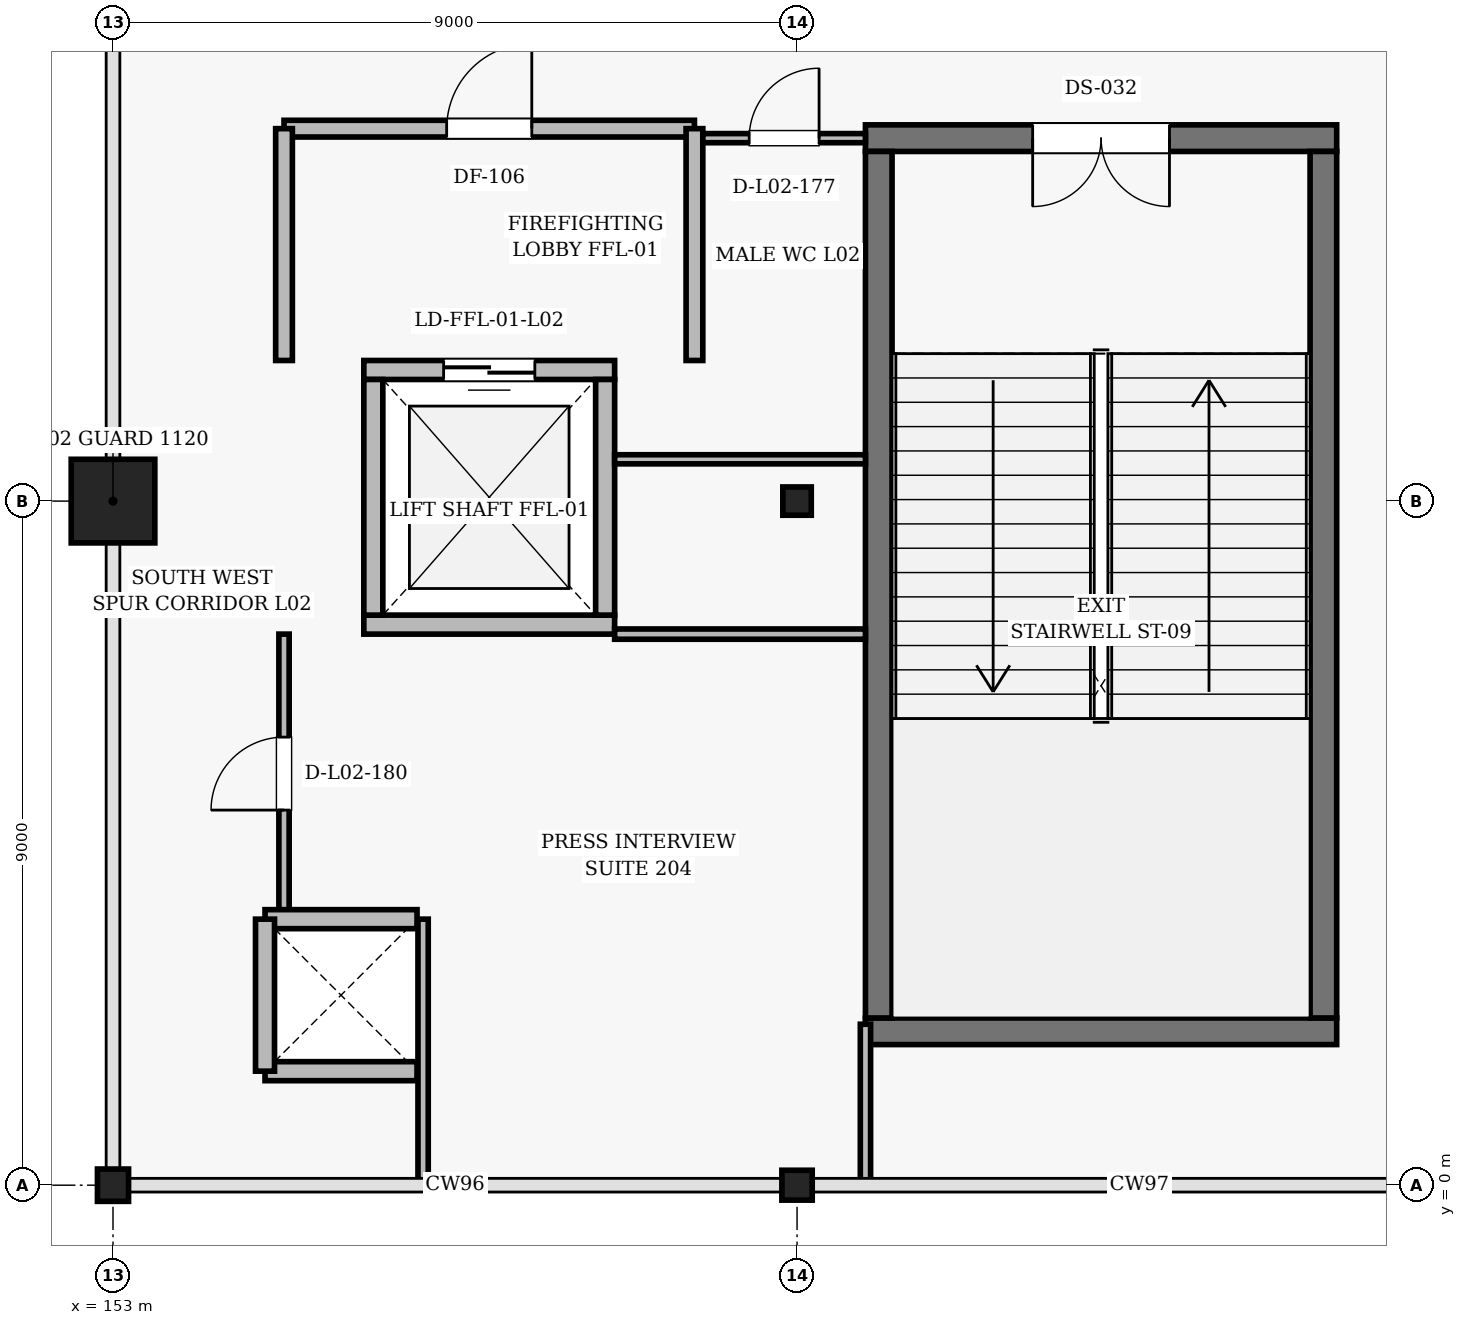
"""IFC4 building model, lengths in metres.
Left out: names, types, materials, properties, quantities, classifications, styles, units other than length and angle.
Written with IfcOpenShell. Run it as: python <this file> out.ifc"""

import sys

from ifc_helpers import new_model, si_unit, direction, frame, frame_2d, origin, origin_2d, place, context, subcontext, project, spatial, rectangle, i_section, extrude, element, fill, save


model = new_model("IFC4")
c1 = context("Model", 3, precision=1e-05, world=origin(), true_north=direction((0.0, 1.0)))
c2 = subcontext(c1, "Body", "Model", "MODEL_VIEW")
j1 = project(units=[si_unit("LENGTHUNIT", "METRE"), si_unit("PLANEANGLEUNIT", "RADIAN")], contexts=[c1])
p1 = place(None, origin())
s1 = spatial("IfcSite", under=j1, at=p1, CompositionType="ELEMENT")
p2 = place(p1, origin())
s2 = spatial("IfcBuilding", under=s1, at=p2, CompositionType="ELEMENT")
p3 = place(p2, frame((0.0, 0.0, 10.8)))
s3 = spatial("IfcBuildingStorey", under=s2, at=p3, CompositionType="ELEMENT", Elevation=10.8)
p4 = place(p3, frame((153.0, 0.0, 0.0), z_axis=(0.0, 0.0, 1.0), x_axis=(1.0, 0.0, 0.0)))
e1 = element("IfcColumn", 1, at=p4, inside=s3, PredefinedType="COLUMN", context=c2, shape_type="SweptSolid", body=[
    extrude(i_section(OverallWidth=0.409, OverallDepth=0.425, WebThickness=0.031, FlangeThickness=0.049, FilletRadius=0.02, at=origin_2d()), origin(), (0.0, 0.0, 1.0), 4.8),
])
p5 = place(p3, frame((153.0, 9.0, 0.0), z_axis=(0.0, 0.0, 1.0), x_axis=(1.0, 0.0, 0.0)))
e2 = element("IfcColumn", 2, at=p5, inside=s3, PredefinedType="COLUMN", context=c2, shape_type="SweptSolid", body=[
    extrude(rectangle(XDim=1.1, YDim=1.1, at=origin_2d()), origin(), (0.0, 0.0, 1.0), 4.8),
])
p6 = place(p3, frame((162.0, 0.0, 0.0), z_axis=(0.0, 0.0, 1.0), x_axis=(1.0, 0.0, 0.0)))
e3 = element("IfcColumn", 3, at=p6, inside=s3, PredefinedType="COLUMN", context=c2, shape_type="SweptSolid", body=[
    extrude(i_section(OverallWidth=0.399, OverallDepth=0.393, WebThickness=0.023, FlangeThickness=0.037, FilletRadius=0.018, at=origin_2d()), origin(), (0.0, 0.0, 1.0), 4.8),
])
p7 = place(p3, frame((162.0, 9.0, 0.0), z_axis=(0.0, 0.0, 1.0), x_axis=(1.0, 0.0, 0.0)))
e4 = element("IfcColumn", 4, at=p7, inside=s3, PredefinedType="COLUMN", context=c2, shape_type="SweptSolid", body=[
    extrude(i_section(OverallWidth=0.374, OverallDepth=0.372, WebThickness=0.016, FlangeThickness=0.026, FilletRadius=0.016, at=origin_2d()), origin(), (0.0, 0.0, 1.0), 4.8),
])
p8 = place(p3, frame((162.9, 2.025, 0.0), z_axis=(0.0, 0.0, 1.0), x_axis=(1.0, 0.0, 0.0)))
e5 = element("IfcWall", 5, at=p8, inside=s3, PredefinedType="SHEAR", context=c2, shape_type="SweptSolid", body=[
    extrude(rectangle(XDim=6.2, YDim=0.35, at=frame_2d((3.1, 0.0))), origin(), (0.0, 0.0, 1.0), 4.6),
])
p9 = place(p3, frame((169.1, 13.775, 0.0), z_axis=(0.0, 0.0, 1.0), x_axis=(-1.0, 0.0, 0.0)))
e6 = element("IfcWall", 6, at=p9, inside=s3, PredefinedType="SHEAR", context=c2, shape_type="SweptSolid", body=[
    extrude(rectangle(XDim=6.2, YDim=0.35, at=frame_2d((3.1, 0.0))), origin(), (0.0, 0.0, 1.0), 4.6),
])
p10 = place(p9, frame((2.2, 0.0, 0.0)))
e7 = element("IfcOpeningElement", 7, at=p10, cuts=e6, PredefinedType="OPENING", context=c2, shape_type="SweptSolid", body=[
    extrude(rectangle(XDim=1.8, YDim=2.2, at=frame_2d((0.9, 1.1))), frame((0.0, 0.185, 0.0), z_axis=(0.0, -1.0, 0.0), x_axis=(1.0, 0.0, 0.0)), (0.0, 0.0, 1.0), 0.37),
])
for number, where, z_axis, x_axis in (
    (8, (163.075, 13.6, 0.0), (0.0, 0.0, 1.0), (0.0, -1.0, 0.0)),
    (9, (168.925, 2.2, 0.0), (0.0, 0.0, 1.0), (0.0, 1.0, 0.0)),
):
    element("IfcWall", number, at=place(p3, frame(where, z_axis=z_axis, x_axis=x_axis)), inside=s3, PredefinedType="SHEAR", context=c2, shape_type="SweptSolid", body=[
        extrude(rectangle(XDim=11.4, YDim=0.35, at=frame_2d((5.7, 0.0))), origin(), (0.0, 0.0, 1.0), 4.6),
    ])
p11 = place(p3, frame((156.3, 7.375, 0.0), z_axis=(0.0, 0.0, 1.0), x_axis=(1.0, 0.0, 0.0)))
e10 = element("IfcWall", 10, at=p11, inside=s3, PredefinedType="SOLIDWALL", context=c2, shape_type="SweptSolid", body=[
    extrude(rectangle(XDim=3.3, YDim=0.25, at=frame_2d((1.65, 0.0))), origin(), (0.0, 0.0, 1.0), 4.6),
])
p12 = place(p3, frame((159.6, 10.725, 0.0), z_axis=(0.0, 0.0, 1.0), x_axis=(-1.0, 0.0, 0.0)))
e11 = element("IfcWall", 11, at=p12, inside=s3, PredefinedType="SOLIDWALL", context=c2, shape_type="SweptSolid", body=[
    extrude(rectangle(XDim=3.3, YDim=0.25, at=frame_2d((1.65, 0.0))), origin(), (0.0, 0.0, 1.0), 4.6),
])
p13 = place(p12, frame((1.05, 0.0, 0.0)))
e12 = element("IfcOpeningElement", 12, at=p13, cuts=e11, PredefinedType="OPENING", context=c2, shape_type="SweptSolid", body=[
    extrude(rectangle(XDim=1.2, YDim=2.25, at=frame_2d((0.6, 1.125))), frame((0.0, 0.135, 0.0), z_axis=(0.0, -1.0, 0.0), x_axis=(1.0, 0.0, 0.0)), (0.0, 0.0, 1.0), 0.27),
])
for number, where, z_axis, x_axis in (
    (13, (156.425, 10.6, 0.0), (0.0, 0.0, 1.0), (0.0, -1.0, 0.0)),
    (14, (159.475, 7.5, 0.0), (0.0, 0.0, 1.0), (0.0, 1.0, 0.0)),
):
    element("IfcWall", number, at=place(p3, frame(where, z_axis=z_axis, x_axis=x_axis)), inside=s3, PredefinedType="SOLIDWALL", context=c2, shape_type="SweptSolid", body=[
        extrude(rectangle(XDim=3.1, YDim=0.25, at=frame_2d((1.55, 0.0))), origin(), (0.0, 0.0, 1.0), 4.6),
    ])
p14 = place(p3, frame((155.25, 13.9, 0.0), z_axis=(0.0, 0.0, 1.0), x_axis=(1.0, 0.0, 0.0)))
e15 = element("IfcWall", 15, at=p14, inside=s3, PredefinedType="SOLIDWALL", context=c2, shape_type="SweptSolid", body=[
    extrude(rectangle(XDim=5.4, YDim=0.22, at=frame_2d((2.7, 0.0))), origin(), (0.0, 0.0, 1.0), 4.6),
])
p15 = place(p14, frame((2.14, 0.0, 0.0)))
e16 = element("IfcOpeningElement", 16, at=p15, cuts=e15, PredefinedType="OPENING", context=c2, shape_type="SweptSolid", body=[
    extrude(rectangle(XDim=1.12, YDim=2.2, at=frame_2d((0.56, 1.1))), frame((0.0, 0.12, 0.0), z_axis=(0.0, -1.0, 0.0), x_axis=(1.0, 0.0, 0.0)), (0.0, 0.0, 1.0), 0.24),
])
for number, where, z_axis, x_axis in (
    (17, (155.25, 10.85, 0.0), (0.0, 0.0, 1.0), (0.0, 1.0, 0.0)),
    (18, (160.65, 10.85, 0.0), (0.0, 0.0, 1.0), (0.0, 1.0, 0.0)),
):
    element("IfcWall", number, at=place(p3, frame(where, z_axis=z_axis, x_axis=x_axis)), inside=s3, PredefinedType="SOLIDWALL", context=c2, shape_type="SweptSolid", body=[
        extrude(rectangle(XDim=3.05, YDim=0.22, at=frame_2d((1.525, 0.0))), origin(), (0.0, 0.0, 1.0), 4.6),
    ])
p16 = place(p3, frame((160.76, 13.775, 0.0), z_axis=(0.0, 0.0, 1.0), x_axis=(1.0, 0.0, 0.0)))
e19 = element("IfcWall", 19, at=p16, inside=s3, PredefinedType="PARTITIONING", context=c2, shape_type="SweptSolid", body=[
    extrude(rectangle(XDim=2.14, YDim=0.12, at=frame_2d((1.07, 0.0))), origin(), (0.0, 0.0, 1.0), 3.89),
])
p17 = place(p16, frame((0.61, 0.0, 0.0)))
e20 = element("IfcOpeningElement", 20, at=p17, cuts=e19, PredefinedType="OPENING", context=c2, shape_type="SweptSolid", body=[
    extrude(rectangle(XDim=0.92, YDim=2.12, at=frame_2d((0.46, 1.06))), frame((0.0, 0.07, 0.0), z_axis=(0.0, -1.0, 0.0), x_axis=(1.0, 0.0, 0.0)), (0.0, 0.0, 1.0), 0.14),
])
p18 = place(p3, frame((162.9, 9.55, 0.0), z_axis=(0.0, 0.0, 1.0), x_axis=(-1.0, 0.0, 0.0)))
e21 = element("IfcWall", 21, at=p18, inside=s3, PredefinedType="PARTITIONING", context=c2, shape_type="SweptSolid", body=[
    extrude(rectangle(XDim=3.3, YDim=0.12, at=frame_2d((1.65, 0.0))), origin(), (0.0, 0.0, 1.0), 3.89),
])
p19 = place(p3, frame((159.6, 7.25, 0.0), z_axis=(0.0, 0.0, 1.0), x_axis=(1.0, 0.0, 0.0)))
e22 = element("IfcWall", 22, at=p19, inside=s3, PredefinedType="PARTITIONING", context=c2, shape_type="SweptSolid", body=[
    extrude(rectangle(XDim=3.3, YDim=0.135, at=frame_2d((1.65, 0.0))), origin(), (0.0, 0.0, 1.0), 3.812),
])
p20 = place(p3, frame((162.9, 2.117, 0.0), z_axis=(0.0, 0.0, 1.0), x_axis=(0.0, -1.0, 0.0)))
e23 = element("IfcWall", 23, at=p20, inside=s3, PredefinedType="PARTITIONING", context=c2, shape_type="SweptSolid", body=[
    extrude(rectangle(XDim=2.105, YDim=0.135, at=frame_2d((1.053, 0.0))), origin(), (0.0, 0.0, 1.0), 4.046),
])
p21 = place(p3, frame((157.08, 0.012, 0.0), z_axis=(0.0, 0.0, 1.0), x_axis=(0.0, 1.0, 0.0)))
e24 = element("IfcWall", 24, at=p21, inside=s3, PredefinedType="PARTITIONING", context=c2, shape_type="SweptSolid", body=[
    extrude(rectangle(XDim=3.488, YDim=0.135, at=frame_2d((1.744, 0.0))), origin(), (0.0, 0.0, 1.0), 4.285),
])
p22 = place(p3, frame((155.25, 3.58, 0.0), z_axis=(0.0, 0.0, 1.0), x_axis=(0.0, 1.0, 0.0)))
e25 = element("IfcWall", 25, at=p22, inside=s3, PredefinedType="PARTITIONING", context=c2, shape_type="SweptSolid", body=[
    extrude(rectangle(XDim=3.67, YDim=0.135, at=frame_2d((1.835, 0.0))), origin(), (0.0, 0.0, 1.0), 4.6),
])
p23 = place(p22, frame((1.355, 0.0, 0.0)))
e26 = element("IfcOpeningElement", 26, at=p23, cuts=e25, PredefinedType="OPENING", context=c2, shape_type="SweptSolid", body=[
    extrude(rectangle(XDim=0.96, YDim=2.15, at=frame_2d((0.48, 1.075))), frame((0.0, 0.078, 0.0), z_axis=(0.0, -1.0, 0.0), x_axis=(1.0, 0.0, 0.0)), (0.0, 0.0, 1.0), 0.155),
])
for number, where, z_axis, x_axis in (
    (27, (155.0, 1.5, 0.0), (0.0, 0.0, 1.0), (1.0, 0.0, 0.0)),
    (28, (157.0, 3.5, 0.0), (0.0, 0.0, 1.0), (-1.0, 0.0, 0.0)),
    (29, (155.0, 3.5, 0.0), (0.0, 0.0, 1.0), (0.0, -1.0, 0.0)),
):
    element("IfcWall", number, at=place(p3, frame(where, z_axis=z_axis, x_axis=x_axis)), inside=s3, PredefinedType="SOLIDWALL", context=c2, shape_type="SweptSolid", body=[
        extrude(rectangle(XDim=2.0, YDim=0.25, at=frame_2d((1.0, 0.0))), origin(), (0.0, 0.0, 1.0), 4.25),
    ])
p24 = place(p10, origin())
e30 = element("IfcDoor", 30, at=p24, inside=s3, OperationType="DOUBLE_DOOR_SINGLE_SWING", PredefinedType="DOOR", context=c2, shape_type="SweptSolid", body=[
    extrude(rectangle(XDim=1.8, YDim=2.2, at=frame_2d((0.9, 1.1))), frame((0.0, 0.025, 0.0), z_axis=(0.0, -1.0, 0.0), x_axis=(1.0, 0.0, 0.0)), (0.0, 0.0, 1.0), 0.05),
])
fill(e7, e30)
p25 = place(p13, origin())
e31 = element("IfcDoor", 31, at=p25, inside=s3, OperationType="DOUBLE_DOOR_SLIDING", PredefinedType="DOOR", context=c2, shape_type="SweptSolid", body=[
    extrude(rectangle(XDim=1.2, YDim=2.25, at=frame_2d((0.6, 1.125))), frame((0.0, 0.025, 0.0), z_axis=(0.0, -1.0, 0.0), x_axis=(1.0, 0.0, 0.0)), (0.0, 0.0, 1.0), 0.05),
])
fill(e12, e31)
p26 = place(p15, origin())
e32 = element("IfcDoor", 32, at=p26, inside=s3, OperationType="SINGLE_SWING_RIGHT", PredefinedType="DOOR", context=c2, shape_type="SweptSolid", body=[
    extrude(rectangle(XDim=1.12, YDim=2.2, at=frame_2d((0.56, 1.1))), frame((0.0, 0.025, 0.0), z_axis=(0.0, -1.0, 0.0), x_axis=(1.0, 0.0, 0.0)), (0.0, 0.0, 1.0), 0.05),
])
fill(e16, e32)
p27 = place(p17, origin())
e33 = element("IfcDoor", 33, at=p27, inside=s3, OperationType="SINGLE_SWING_RIGHT", PredefinedType="DOOR", context=c2, shape_type="SweptSolid", body=[
    extrude(rectangle(XDim=0.92, YDim=2.12, at=frame_2d((0.46, 1.06))), frame((0.0, 0.025, 0.0), z_axis=(0.0, -1.0, 0.0), x_axis=(1.0, 0.0, 0.0)), (0.0, 0.0, 1.0), 0.05),
])
fill(e20, e33)
p28 = place(p23, origin())
e34 = element("IfcDoor", 34, at=p28, inside=s3, OperationType="SINGLE_SWING_LEFT", PredefinedType="DOOR", context=c2, shape_type="SweptSolid", body=[
    extrude(rectangle(XDim=0.96, YDim=2.15, at=frame_2d((0.48, 1.075))), frame((0.0, 0.025, 0.0), z_axis=(0.0, -1.0, 0.0), x_axis=(1.0, 0.0, 0.0)), (0.0, 0.0, 1.0), 0.05),
])
fill(e26, e34)
save(model, sys.argv[1])
